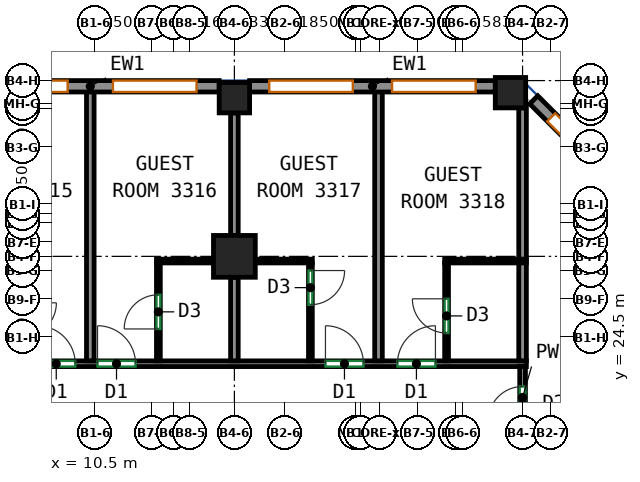
"""IFC4 building model, lengths in metres.
Left out: names, types, materials, properties, quantities, classifications, styles, units other than length and angle.
Written with IfcOpenShell. Run it as: python <this file> out.ifc"""

import sys

from ifc_helpers import new_model, si_unit, direction, frame, frame_2d, origin, origin_2d, place, context, subcontext, project, spatial, rectangle, extrude, source, transform, mapped, element, fill, save


model = new_model("IFC4")
c1 = context("Model", 3, precision=1e-05, world=origin(), true_north=direction((0.0, 1.0)))
c2 = subcontext(c1, "Body", "Model", "MODEL_VIEW")
j1 = project(units=[si_unit("LENGTHUNIT", "METRE"), si_unit("PLANEANGLEUNIT", "RADIAN")], contexts=[c1])
p1 = place(None, origin())
s1 = spatial("IfcSite", under=j1, at=p1, CompositionType="ELEMENT")
p2 = place(p1, origin())
s2 = spatial("IfcBuilding", under=s1, at=p2, CompositionType="ELEMENT")
p3 = place(p2, frame((0.0, 0.0, 147.3)))
s3 = spatial("IfcBuildingStorey", under=s2, at=p3, CompositionType="ELEMENT", Elevation=147.3)
m1 = source(origin(), c2, "Body", "SweptSolid", [
    extrude(rectangle(XDim=1.1, YDim=1.1, at=origin_2d()), origin(), (0.0, 0.0, 1.0), 3.12),
])
p4 = place(p3, frame((14.167, 26.625, 0.0), z_axis=(0.0, 0.0, 1.0), x_axis=(1.0, 0.0, 0.0)))
e1 = element("IfcColumn", 1, at=p4, inside=s3, PredefinedType="COLUMN", context=c2, shape_type="MappedRepresentation", body=[
    mapped(m1, transform((0.0, 0.0, 0.0))),
])
m2 = source(origin(), c2, "Body", "SweptSolid", [
    extrude(rectangle(XDim=0.8, YDim=0.8, at=origin_2d()), origin(), (0.0, 0.0, 1.0), 3.12),
])
for number, where, z_axis, x_axis in (
    (2, (14.167, 30.8, 0.0), (0.0, 0.0, 1.0), (1.0, 0.0, 0.0)),
    (3, (21.432, 30.932, 0.0), (0.0, 0.0, 1.0), (1.0, 0.0, 0.0)),
):
    element("IfcColumn", number, at=place(p3, frame(where, z_axis=z_axis, x_axis=x_axis)), inside=s3, PredefinedType="COLUMN", context=c2, shape_type="MappedRepresentation", body=[
        mapped(m2, transform((0.0, 0.0, 0.0))),
    ])
m3 = source(origin(), c2, "Body", "SweptSolid", [
    extrude(rectangle(XDim=3.5, YDim=0.3, at=frame_2d((1.75, 0.0))), origin(), (0.0, 0.0, 1.0), 3.12),
])
p5 = place(p3, frame((24.519, 28.269, 0.0), z_axis=(0.0, 0.0, 1.0), x_axis=(-0.70707190453, 0.707141656123, 0.0)))
e4 = element("IfcWall", 4, at=p5, inside=s3, PredefinedType="SOLIDWALL", context=c2, shape_type="MappedRepresentation", body=[
    mapped(m3, transform((0.0, 0.0, 0.0))),
])
p6 = place(p5, frame((0.65, 0.0, 0.85)))
e5 = element("IfcOpeningElement", 5, at=p6, cuts=e4, PredefinedType="OPENING", context=c2, shape_type="SweptSolid", body=[
    extrude(rectangle(XDim=2.2, YDim=1.95, at=frame_2d((1.1, 0.975))), frame((0.0, 0.16, 0.0), z_axis=(0.0, -1.0, 0.0), x_axis=(1.0, 0.0, 0.0)), (0.0, 0.0, 1.0), 0.32),
])
m4 = source(origin(), c2, "Body", "SweptSolid", [
    extrude(rectangle(XDim=6.465, YDim=0.3, at=frame_2d((3.232, 0.0))), origin(), (0.0, 0.0, 1.0), 3.12),
])
p7 = place(p3, frame((21.032, 31.1, 0.0), z_axis=(0.0, 0.0, 1.0), x_axis=(-1.0, 0.0, 0.0)))
e6 = element("IfcWall", 6, at=p7, inside=s3, PredefinedType="SOLIDWALL", context=c2, shape_type="MappedRepresentation", body=[
    mapped(m4, transform((0.0, 0.0, 0.0))),
])
p8 = place(p7, frame((0.516, 0.0, 0.85)))
e7 = element("IfcOpeningElement", 7, at=p8, cuts=e6, PredefinedType="OPENING", context=c2, shape_type="SweptSolid", body=[
    extrude(rectangle(XDim=2.2, YDim=1.95, at=frame_2d((1.1, 0.975))), frame((0.0, 0.16, 0.0), z_axis=(0.0, -1.0, 0.0), x_axis=(1.0, 0.0, 0.0)), (0.0, 0.0, 1.0), 0.32),
])
p9 = place(p7, frame((3.749, 0.0, 0.85)))
e8 = element("IfcOpeningElement", 8, at=p9, cuts=e6, PredefinedType="OPENING", context=c2, shape_type="SweptSolid", body=[
    extrude(rectangle(XDim=2.2, YDim=1.95, at=frame_2d((1.1, 0.975))), frame((0.0, 0.16, 0.0), z_axis=(0.0, -1.0, 0.0), x_axis=(1.0, 0.0, 0.0)), (0.0, 0.0, 1.0), 0.32),
])
m5 = source(origin(), c2, "Body", "SweptSolid", [
    extrude(rectangle(XDim=6.783, YDim=0.3, at=frame_2d((3.392, 0.0))), origin(), (0.0, 0.0, 1.0), 3.12),
])
p10 = place(p3, frame((13.767, 31.1, 0.0), z_axis=(0.0, 0.0, 1.0), x_axis=(-1.0, 0.0, 0.0)))
e9 = element("IfcWall", 9, at=p10, inside=s3, PredefinedType="SOLIDWALL", context=c2, shape_type="MappedRepresentation", body=[
    mapped(m5, transform((0.0, 0.0, 0.0))),
])
p11 = place(p10, frame((0.596, 0.0, 0.85)))
e10 = element("IfcOpeningElement", 10, at=p11, cuts=e9, PredefinedType="OPENING", context=c2, shape_type="SweptSolid", body=[
    extrude(rectangle(XDim=2.2, YDim=1.95, at=frame_2d((1.1, 0.975))), frame((0.0, 0.16, 0.0), z_axis=(0.0, -1.0, 0.0), x_axis=(1.0, 0.0, 0.0)), (0.0, 0.0, 1.0), 0.32),
])
p12 = place(p10, frame((3.988, 0.0, 0.85)))
e11 = element("IfcOpeningElement", 11, at=p12, cuts=e9, PredefinedType="OPENING", context=c2, shape_type="SweptSolid", body=[
    extrude(rectangle(XDim=2.2, YDim=1.95, at=frame_2d((1.1, 0.975))), frame((0.0, 0.16, 0.0), z_axis=(0.0, -1.0, 0.0), x_axis=(1.0, 0.0, 0.0)), (0.0, 0.0, 1.0), 0.32),
])
p13 = place(p3, frame((-20.059, 23.8, 0.0), z_axis=(0.0, 0.0, 1.0), x_axis=(1.0, 0.0, 0.0)))
e12 = element("IfcWall", 12, at=p13, inside=s3, PredefinedType="PARTITIONING", context=c2, shape_type="SweptSolid", body=[
    extrude(rectangle(XDim=41.909, YDim=0.15, at=frame_2d((20.955, 0.0))), origin(), (0.0, 0.0, 1.0), 3.12),
])
p14 = place(p13, frame((0.401, 0.0, 0.0)))
e13 = element("IfcOpeningElement", 13, at=p14, cuts=e12, PredefinedType="OPENING", context=c2, shape_type="SweptSolid", body=[
    extrude(rectangle(XDim=1.0, YDim=2.1, at=frame_2d((0.5, 1.05))), frame((0.0, 0.085, 0.0), z_axis=(0.0, -1.0, 0.0), x_axis=(1.0, 0.0, 0.0)), (0.0, 0.0, 1.0), 0.17),
])
p15 = place(p13, frame((6.082, 0.0, 0.0)))
e14 = element("IfcOpeningElement", 14, at=p15, cuts=e12, PredefinedType="OPENING", context=c2, shape_type="SweptSolid", body=[
    extrude(rectangle(XDim=1.0, YDim=2.1, at=frame_2d((0.5, 1.05))), frame((0.0, 0.085, 0.0), z_axis=(0.0, -1.0, 0.0), x_axis=(1.0, 0.0, 0.0)), (0.0, 0.0, 1.0), 0.17),
])
p16 = place(p13, frame((8.08, 0.0, 0.0)))
e15 = element("IfcOpeningElement", 15, at=p16, cuts=e12, PredefinedType="OPENING", context=c2, shape_type="SweptSolid", body=[
    extrude(rectangle(XDim=1.0, YDim=2.1, at=frame_2d((0.5, 1.05))), frame((0.0, 0.085, 0.0), z_axis=(0.0, -1.0, 0.0), x_axis=(1.0, 0.0, 0.0)), (0.0, 0.0, 1.0), 0.17),
])
p17 = place(p13, frame((13.769, 0.0, 0.0)))
e16 = element("IfcOpeningElement", 16, at=p17, cuts=e12, PredefinedType="OPENING", context=c2, shape_type="SweptSolid", body=[
    extrude(rectangle(XDim=1.0, YDim=2.1, at=frame_2d((0.5, 1.05))), frame((0.0, 0.085, 0.0), z_axis=(0.0, -1.0, 0.0), x_axis=(1.0, 0.0, 0.0)), (0.0, 0.0, 1.0), 0.17),
])
p18 = place(p13, frame((15.56, 0.0, 0.0)))
e17 = element("IfcOpeningElement", 17, at=p18, cuts=e12, PredefinedType="OPENING", context=c2, shape_type="SweptSolid", body=[
    extrude(rectangle(XDim=1.0, YDim=2.1, at=frame_2d((0.5, 1.05))), frame((0.0, 0.085, 0.0), z_axis=(0.0, -1.0, 0.0), x_axis=(1.0, 0.0, 0.0)), (0.0, 0.0, 1.0), 0.17),
])
p19 = place(p13, frame((21.625, 0.0, 0.0)))
e18 = element("IfcOpeningElement", 18, at=p19, cuts=e12, PredefinedType="OPENING", context=c2, shape_type="SweptSolid", body=[
    extrude(rectangle(XDim=1.0, YDim=2.1, at=frame_2d((0.5, 1.05))), frame((0.0, 0.085, 0.0), z_axis=(0.0, -1.0, 0.0), x_axis=(1.0, 0.0, 0.0)), (0.0, 0.0, 1.0), 0.17),
])
p20 = place(p13, frame((23.212, 0.0, 0.0)))
e19 = element("IfcOpeningElement", 19, at=p20, cuts=e12, PredefinedType="OPENING", context=c2, shape_type="SweptSolid", body=[
    extrude(rectangle(XDim=1.0, YDim=2.1, at=frame_2d((0.5, 1.05))), frame((0.0, 0.085, 0.0), z_axis=(0.0, -1.0, 0.0), x_axis=(1.0, 0.0, 0.0)), (0.0, 0.0, 1.0), 0.17),
])
p21 = place(p13, frame((29.038, 0.0, 0.0)))
e20 = element("IfcOpeningElement", 20, at=p21, cuts=e12, PredefinedType="OPENING", context=c2, shape_type="SweptSolid", body=[
    extrude(rectangle(XDim=1.0, YDim=2.1, at=frame_2d((0.5, 1.05))), frame((0.0, 0.085, 0.0), z_axis=(0.0, -1.0, 0.0), x_axis=(1.0, 0.0, 0.0)), (0.0, 0.0, 1.0), 0.17),
])
p22 = place(p13, frame((30.624, 0.0, 0.0)))
e21 = element("IfcOpeningElement", 21, at=p22, cuts=e12, PredefinedType="OPENING", context=c2, shape_type="SweptSolid", body=[
    extrude(rectangle(XDim=1.0, YDim=2.1, at=frame_2d((0.5, 1.05))), frame((0.0, 0.085, 0.0), z_axis=(0.0, -1.0, 0.0), x_axis=(1.0, 0.0, 0.0)), (0.0, 0.0, 1.0), 0.17),
])
p23 = place(p13, frame((36.622, 0.0, 0.0)))
e22 = element("IfcOpeningElement", 22, at=p23, cuts=e12, PredefinedType="OPENING", context=c2, shape_type="SweptSolid", body=[
    extrude(rectangle(XDim=1.0, YDim=2.1, at=frame_2d((0.5, 1.05))), frame((0.0, 0.085, 0.0), z_axis=(0.0, -1.0, 0.0), x_axis=(1.0, 0.0, 0.0)), (0.0, 0.0, 1.0), 0.17),
])
p24 = place(p13, frame((38.516, 0.0, 0.0)))
e23 = element("IfcOpeningElement", 23, at=p24, cuts=e12, PredefinedType="OPENING", context=c2, shape_type="SweptSolid", body=[
    extrude(rectangle(XDim=1.0, YDim=2.1, at=frame_2d((0.5, 1.05))), frame((0.0, 0.085, 0.0), z_axis=(0.0, -1.0, 0.0), x_axis=(1.0, 0.0, 0.0)), (0.0, 0.0, 1.0), 0.17),
])
p25 = place(p3, frame((21.75, 22.1, 0.0), z_axis=(0.0, 0.0, 1.0), x_axis=(0.0, 1.0, 0.0)))
e24 = element("IfcWall", 24, at=p25, inside=s3, PredefinedType="PARTITIONING", context=c2, shape_type="SweptSolid", body=[
    extrude(rectangle(XDim=1.625, YDim=0.15, at=frame_2d((0.812, 0.0))), origin(), (0.0, 0.0, 1.0), 3.12),
])
p26 = place(p25, frame((0.2, 0.0, 0.0)))
e25 = element("IfcOpeningElement", 25, at=p26, cuts=e24, PredefinedType="OPENING", context=c2, shape_type="SweptSolid", body=[
    extrude(rectangle(XDim=0.9, YDim=2.1, at=frame_2d((0.45, 1.05))), frame((0.0, 0.085, 0.0), z_axis=(0.0, -1.0, 0.0), x_axis=(1.0, 0.0, 0.0)), (0.0, 0.0, 1.0), 0.17),
])
p27 = place(p3, frame((10.375, 23.877, 0.0), z_axis=(0.0, 0.0, 1.0), x_axis=(0.0, 1.0, 0.0)))
e26 = element("IfcWall", 26, at=p27, inside=s3, PredefinedType="PARTITIONING", context=c2, shape_type="SweptSolid", body=[
    extrude(rectangle(XDim=7.123, YDim=0.2, at=frame_2d((3.562, 0.0))), origin(), (0.0, 0.0, 1.0), 3.12),
])
p28 = place(p3, frame((12.117, 26.502, 0.0), z_axis=(0.0, 0.0, 1.0), x_axis=(1.0, 0.0, 0.0)))
e27 = element("IfcWall", 27, at=p28, inside=s3, PredefinedType="PARTITIONING", context=c2, shape_type="SweptSolid", body=[
    extrude(rectangle(XDim=1.5, YDim=0.1, at=frame_2d((0.75, 0.0))), origin(), (0.0, 0.0, 1.0), 3.12),
])
p29 = place(p3, frame((12.167, 23.877, 0.0), z_axis=(0.0, 0.0, 1.0), x_axis=(0.0, 1.0, 0.0)))
e28 = element("IfcWall", 28, at=p29, inside=s3, PredefinedType="PARTITIONING", context=c2, shape_type="SweptSolid", body=[
    extrude(rectangle(XDim=2.575, YDim=0.1, at=frame_2d((1.288, 0.0))), origin(), (0.0, 0.0, 1.0), 3.12),
])
p30 = place(p29, frame((0.838, 0.0, 0.0)))
e29 = element("IfcOpeningElement", 29, at=p30, cuts=e28, PredefinedType="OPENING", context=c2, shape_type="SweptSolid", body=[
    extrude(rectangle(XDim=0.9, YDim=2.1, at=frame_2d((0.45, 1.05))), frame((0.0, 0.06, 0.0), z_axis=(0.0, -1.0, 0.0), x_axis=(1.0, 0.0, 0.0)), (0.0, 0.0, 1.0), 0.12),
])
p31 = place(p3, frame((14.167, 27.175, 0.0), z_axis=(0.0, 0.0, 1.0), x_axis=(0.0, 1.0, 0.0)))
e30 = element("IfcWall", 30, at=p31, inside=s3, PredefinedType="PARTITIONING", context=c2, shape_type="SweptSolid", body=[
    extrude(rectangle(XDim=3.225, YDim=0.2, at=frame_2d((1.612, 0.0))), origin(), (0.0, 0.0, 1.0), 3.12),
])
p32 = place(p3, frame((14.167, 23.877, 0.0), z_axis=(0.0, 0.0, 1.0), x_axis=(0.0, 1.0, 0.0)))
e31 = element("IfcWall", 31, at=p32, inside=s3, PredefinedType="PARTITIONING", context=c2, shape_type="SweptSolid", body=[
    extrude(rectangle(XDim=2.198, YDim=0.2, at=frame_2d((1.099, 0.0))), origin(), (0.0, 0.0, 1.0), 3.12),
])
p33 = place(p3, frame((14.717, 26.502, 0.0), z_axis=(0.0, 0.0, 1.0), x_axis=(1.0, 0.0, 0.0)))
e32 = element("IfcWall", 32, at=p33, inside=s3, PredefinedType="PARTITIONING", context=c2, shape_type="SweptSolid", body=[
    extrude(rectangle(XDim=1.5, YDim=0.1, at=frame_2d((0.75, 0.0))), origin(), (0.0, 0.0, 1.0), 3.12),
])
p34 = place(p3, frame((16.167, 26.452, 0.0), z_axis=(0.0, 0.0, 1.0), x_axis=(0.0, -1.0, 0.0)))
e33 = element("IfcWall", 33, at=p34, inside=s3, PredefinedType="PARTITIONING", context=c2, shape_type="SweptSolid", body=[
    extrude(rectangle(XDim=2.575, YDim=0.1, at=frame_2d((1.288, 0.0))), origin(), (0.0, 0.0, 1.0), 3.12),
])
p35 = place(p34, frame((0.2, 0.0, 0.0)))
e34 = element("IfcOpeningElement", 34, at=p35, cuts=e33, PredefinedType="OPENING", context=c2, shape_type="SweptSolid", body=[
    extrude(rectangle(XDim=0.9, YDim=2.1, at=frame_2d((0.45, 1.05))), frame((0.0, 0.06, 0.0), z_axis=(0.0, -1.0, 0.0), x_axis=(1.0, 0.0, 0.0)), (0.0, 0.0, 1.0), 0.12),
])
p36 = place(p3, frame((17.959, 23.877, 0.0), z_axis=(0.0, 0.0, 1.0), x_axis=(0.0, 1.0, 0.0)))
e35 = element("IfcWall", 35, at=p36, inside=s3, PredefinedType="PARTITIONING", context=c2, shape_type="SweptSolid", body=[
    extrude(rectangle(XDim=7.123, YDim=0.2, at=frame_2d((3.562, 0.0))), origin(), (0.0, 0.0, 1.0), 3.12),
])
p37 = place(p3, frame((19.7, 26.502, 0.0), z_axis=(0.0, 0.0, 1.0), x_axis=(1.0, 0.0, 0.0)))
e36 = element("IfcWall", 36, at=p37, inside=s3, PredefinedType="PARTITIONING", context=c2, shape_type="SweptSolid", body=[
    extrude(rectangle(XDim=2.15, YDim=0.1, at=frame_2d((1.075, 0.0))), origin(), (0.0, 0.0, 1.0), 3.12),
])
p38 = place(p3, frame((19.75, 23.877, 0.0), z_axis=(0.0, 0.0, 1.0), x_axis=(0.0, 1.0, 0.0)))
e37 = element("IfcWall", 37, at=p38, inside=s3, PredefinedType="PARTITIONING", context=c2, shape_type="SweptSolid", body=[
    extrude(rectangle(XDim=2.575, YDim=0.1, at=frame_2d((1.288, 0.0))), origin(), (0.0, 0.0, 1.0), 3.12),
])
p39 = place(p38, frame((0.731, 0.0, 0.0)))
e38 = element("IfcOpeningElement", 38, at=p39, cuts=e37, PredefinedType="OPENING", context=c2, shape_type="SweptSolid", body=[
    extrude(rectangle(XDim=0.9, YDim=2.1, at=frame_2d((0.45, 1.05))), frame((0.0, 0.06, 0.0), z_axis=(0.0, -1.0, 0.0), x_axis=(1.0, 0.0, 0.0)), (0.0, 0.0, 1.0), 0.12),
])
p40 = place(p3, frame((21.75, 26.552, 0.0), z_axis=(0.0, 0.0, 1.0), x_axis=(0.0, 1.0, 0.0)))
e39 = element("IfcWall", 39, at=p40, inside=s3, PredefinedType="PARTITIONING", context=c2, shape_type="SweptSolid", body=[
    extrude(rectangle(XDim=3.98, YDim=0.2, at=frame_2d((1.99, 0.0))), origin(), (0.0, 0.0, 1.0), 3.12),
])
p41 = place(p3, frame((21.75, 23.877, 0.0), z_axis=(0.0, 0.0, 1.0), x_axis=(0.0, 1.0, 0.0)))
e40 = element("IfcWall", 40, at=p41, inside=s3, PredefinedType="PARTITIONING", context=c2, shape_type="SweptSolid", body=[
    extrude(rectangle(XDim=2.575, YDim=0.2, at=frame_2d((1.288, 0.0))), origin(), (0.0, 0.0, 1.0), 3.12),
])
p42 = place(p6, origin())
e41 = element("IfcWindow", 41, at=p42, inside=s3, PartitioningType="SINGLE_PANEL", PredefinedType="WINDOW", context=c2, shape_type="SweptSolid", body=[
    extrude(rectangle(XDim=2.2, YDim=1.95, at=frame_2d((1.1, 0.975))), frame((0.0, 0.03, 0.0), z_axis=(0.0, -1.0, 0.0), x_axis=(1.0, 0.0, 0.0)), (0.0, 0.0, 1.0), 0.06),
])
fill(e5, e41)
p43 = place(p8, origin())
e42 = element("IfcWindow", 42, at=p43, inside=s3, PartitioningType="SINGLE_PANEL", PredefinedType="WINDOW", context=c2, shape_type="SweptSolid", body=[
    extrude(rectangle(XDim=2.2, YDim=1.95, at=frame_2d((1.1, 0.975))), frame((0.0, 0.03, 0.0), z_axis=(0.0, -1.0, 0.0), x_axis=(1.0, 0.0, 0.0)), (0.0, 0.0, 1.0), 0.06),
])
fill(e7, e42)
p44 = place(p9, origin())
e43 = element("IfcWindow", 43, at=p44, inside=s3, PartitioningType="SINGLE_PANEL", PredefinedType="WINDOW", context=c2, shape_type="SweptSolid", body=[
    extrude(rectangle(XDim=2.2, YDim=1.95, at=frame_2d((1.1, 0.975))), frame((0.0, 0.03, 0.0), z_axis=(0.0, -1.0, 0.0), x_axis=(1.0, 0.0, 0.0)), (0.0, 0.0, 1.0), 0.06),
])
fill(e8, e43)
p45 = place(p11, origin())
e44 = element("IfcWindow", 44, at=p45, inside=s3, PartitioningType="SINGLE_PANEL", PredefinedType="WINDOW", context=c2, shape_type="SweptSolid", body=[
    extrude(rectangle(XDim=2.2, YDim=1.95, at=frame_2d((1.1, 0.975))), frame((0.0, 0.03, 0.0), z_axis=(0.0, -1.0, 0.0), x_axis=(1.0, 0.0, 0.0)), (0.0, 0.0, 1.0), 0.06),
])
fill(e10, e44)
p46 = place(p12, origin())
e45 = element("IfcWindow", 45, at=p46, inside=s3, PartitioningType="SINGLE_PANEL", PredefinedType="WINDOW", context=c2, shape_type="SweptSolid", body=[
    extrude(rectangle(XDim=2.2, YDim=1.95, at=frame_2d((1.1, 0.975))), frame((0.0, 0.03, 0.0), z_axis=(0.0, -1.0, 0.0), x_axis=(1.0, 0.0, 0.0)), (0.0, 0.0, 1.0), 0.06),
])
fill(e11, e45)
p47 = place(p26, origin())
e46 = element("IfcDoor", 46, at=p47, inside=s3, OperationType="SINGLE_SWING_LEFT", PredefinedType="DOOR", context=c2, shape_type="SweptSolid", body=[
    extrude(rectangle(XDim=0.9, YDim=2.1, at=frame_2d((0.45, 1.05))), frame((0.0, 0.025, 0.0), z_axis=(0.0, -1.0, 0.0), x_axis=(1.0, 0.0, 0.0)), (0.0, 0.0, 1.0), 0.05),
])
fill(e25, e46)
p48 = place(p21, origin())
e47 = element("IfcDoor", 47, at=p48, inside=s3, OperationType="SINGLE_SWING_LEFT", PredefinedType="DOOR", context=c2, shape_type="SweptSolid", body=[
    extrude(rectangle(XDim=1.0, YDim=2.1, at=frame_2d((0.5, 1.05))), frame((0.0, 0.025, 0.0), z_axis=(0.0, -1.0, 0.0), x_axis=(1.0, 0.0, 0.0)), (0.0, 0.0, 1.0), 0.05),
])
fill(e20, e47)
p49 = place(p22, origin())
e48 = element("IfcDoor", 48, at=p49, inside=s3, OperationType="SINGLE_SWING_LEFT", PredefinedType="DOOR", context=c2, shape_type="SweptSolid", body=[
    extrude(rectangle(XDim=1.0, YDim=2.1, at=frame_2d((0.5, 1.05))), frame((0.0, 0.025, 0.0), z_axis=(0.0, -1.0, 0.0), x_axis=(1.0, 0.0, 0.0)), (0.0, 0.0, 1.0), 0.05),
])
fill(e21, e48)
p50 = place(p23, origin())
e49 = element("IfcDoor", 49, at=p50, inside=s3, OperationType="SINGLE_SWING_LEFT", PredefinedType="DOOR", context=c2, shape_type="SweptSolid", body=[
    extrude(rectangle(XDim=1.0, YDim=2.1, at=frame_2d((0.5, 1.05))), frame((0.0, 0.025, 0.0), z_axis=(0.0, -1.0, 0.0), x_axis=(1.0, 0.0, 0.0)), (0.0, 0.0, 1.0), 0.05),
])
fill(e22, e49)
p51 = place(p24, origin())
e50 = element("IfcDoor", 50, at=p51, inside=s3, OperationType="SINGLE_SWING_RIGHT", PredefinedType="DOOR", context=c2, shape_type="SweptSolid", body=[
    extrude(rectangle(XDim=1.0, YDim=2.1, at=frame_2d((0.5, 1.05))), frame((0.0, 0.025, 0.0), z_axis=(0.0, -1.0, 0.0), x_axis=(1.0, 0.0, 0.0)), (0.0, 0.0, 1.0), 0.05),
])
fill(e23, e50)
p52 = place(p39, origin())
e51 = element("IfcDoor", 51, at=p52, inside=s3, OperationType="SINGLE_SWING_RIGHT", PredefinedType="DOOR", context=c2, shape_type="SweptSolid", body=[
    extrude(rectangle(XDim=0.9, YDim=2.1, at=frame_2d((0.45, 1.05))), frame((0.0, 0.025, 0.0), z_axis=(0.0, -1.0, 0.0), x_axis=(1.0, 0.0, 0.0)), (0.0, 0.0, 1.0), 0.05),
])
fill(e38, e51)
p53 = place(p30, origin())
e52 = element("IfcDoor", 52, at=p53, inside=s3, OperationType="SINGLE_SWING_LEFT", PredefinedType="DOOR", context=c2, shape_type="SweptSolid", body=[
    extrude(rectangle(XDim=0.9, YDim=2.1, at=frame_2d((0.45, 1.05))), frame((0.0, 0.025, 0.0), z_axis=(0.0, -1.0, 0.0), x_axis=(1.0, 0.0, 0.0)), (0.0, 0.0, 1.0), 0.05),
])
fill(e29, e52)
p54 = place(p35, origin())
e53 = element("IfcDoor", 53, at=p54, inside=s3, OperationType="SINGLE_SWING_LEFT", PredefinedType="DOOR", context=c2, shape_type="SweptSolid", body=[
    extrude(rectangle(XDim=0.9, YDim=2.1, at=frame_2d((0.45, 1.05))), frame((0.0, 0.025, 0.0), z_axis=(0.0, -1.0, 0.0), x_axis=(1.0, 0.0, 0.0)), (0.0, 0.0, 1.0), 0.05),
])
fill(e34, e53)
save(model, sys.argv[1])
